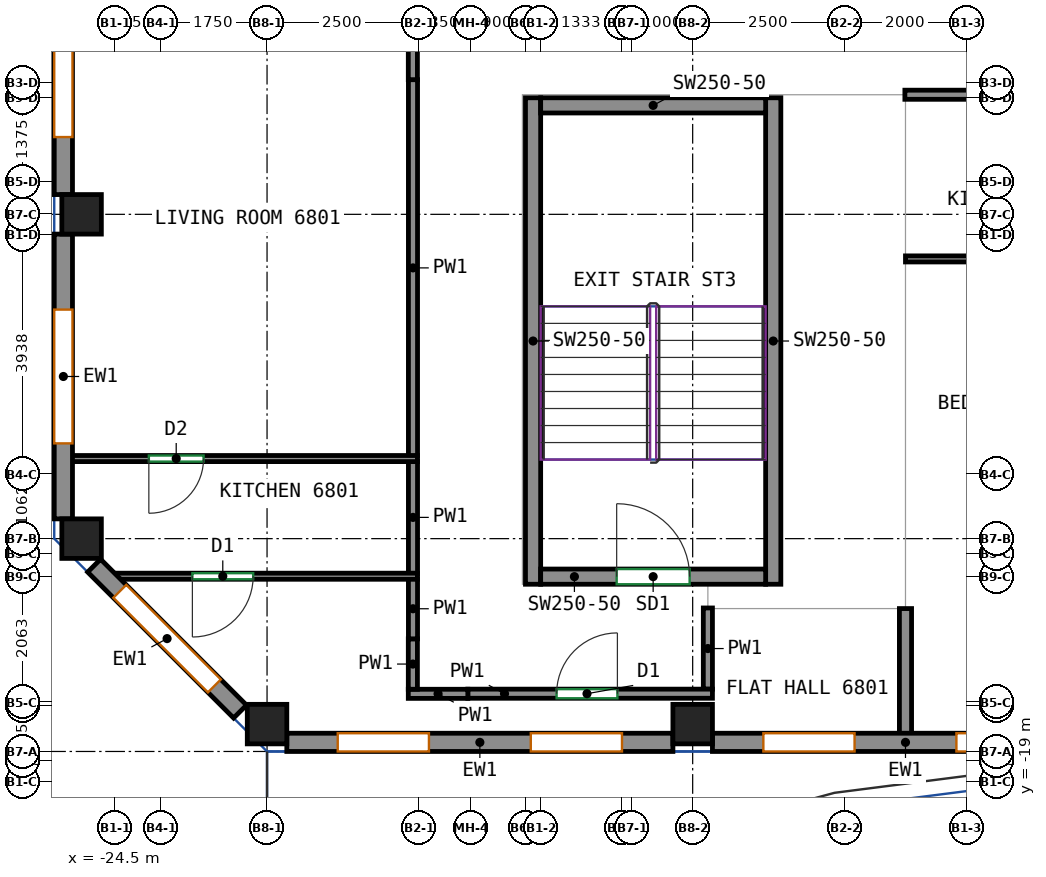
"""IFC4 building model, lengths in metres.
Left out: names, types, materials, properties, quantities, classifications, styles, units other than length and angle.
Written with IfcOpenShell. Run it as: python <this file> out.ifc"""

import sys

from ifc_helpers import new_model, si_unit, direction, frame, frame_2d, origin, origin_2d, place, context, subcontext, project, spatial, rectangle, extrude, source, transform, mapped, element, fill, save


model = new_model("IFC4")
c1 = context("Model", 3, precision=1e-05, world=origin(), true_north=direction((0.0, 1.0)))
c2 = subcontext(c1, "Body", "Model", "MODEL_VIEW")
j1 = project(units=[si_unit("LENGTHUNIT", "METRE"), si_unit("PLANEANGLEUNIT", "RADIAN")], contexts=[c1])
p1 = place(None, origin())
s1 = spatial("IfcSite", under=j1, at=p1, CompositionType="ELEMENT")
p2 = place(p1, origin())
s2 = spatial("IfcBuilding", under=s1, at=p2, CompositionType="ELEMENT")
p3 = place(p2, frame((0.0, 0.0, 277.2)))
s3 = spatial("IfcBuildingStorey", under=s2, at=p3, CompositionType="ELEMENT", Elevation=277.2)
m1 = source(origin(), c2, "Body", "SweptSolid", [
    extrude(rectangle(XDim=0.65, YDim=0.65, at=origin_2d()), origin(), (0.0, 0.0, 1.0), 3.12),
])
for number, where, z_axis, x_axis in (
    (1, (-25.05, -15.0, 0.0), (0.0, 0.0, 1.0), (1.0, 0.0, 0.0)),
    (2, (-25.05, -9.667, 0.0), (0.0, 0.0, 1.0), (1.0, 0.0, 0.0)),
    (3, (-22.0, -18.05, 0.0), (0.0, 0.0, 1.0), (1.0, 0.0, 0.0)),
    (4, (-15.0, -18.05, 0.0), (0.0, 0.0, 1.0), (1.0, 0.0, 0.0)),
):
    element("IfcColumn", number, at=place(p3, frame(where, z_axis=z_axis, x_axis=x_axis)), inside=s3, PredefinedType="COLUMN", context=c2, shape_type="MappedRepresentation", body=[
        mapped(m1, transform((0.0, 0.0, 0.0))),
    ])
m2 = source(origin(), c2, "Body", "SweptSolid", [
    extrude(rectangle(XDim=8.0, YDim=0.25, at=frame_2d((4.0, 0.0))), origin(), (0.0, 0.0, 1.0), 3.12),
])
for number, where, z_axis, x_axis in (
    (5, (-17.625, -15.75, 0.0), (0.0, 0.0, 1.0), (0.0, 1.0, 0.0)),
    (6, (-13.675, -15.75, 0.0), (0.0, 0.0, 1.0), (0.0, 1.0, 0.0)),
):
    element("IfcWall", number, at=place(p3, frame(where, z_axis=z_axis, x_axis=x_axis)), inside=s3, PredefinedType="SHEAR", context=c2, shape_type="MappedRepresentation", body=[
        mapped(m2, transform((0.0, 0.0, 0.0))),
    ])
m3 = source(origin(), c2, "Body", "SweptSolid", [
    extrude(rectangle(XDim=3.7, YDim=0.25, at=frame_2d((1.85, 0.0))), origin(), (0.0, 0.0, 1.0), 3.12),
])
p4 = place(p3, frame((-17.5, -15.625, 0.0), z_axis=(0.0, 0.0, 1.0), x_axis=(1.0, 0.0, 0.0)))
e7 = element("IfcWall", 7, at=p4, inside=s3, PredefinedType="SHEAR", context=c2, shape_type="MappedRepresentation", body=[
    mapped(m3, transform((0.0, 0.0, 0.0))),
])
p5 = place(p4, frame((1.25, 0.0, 0.0)))
e8 = element("IfcOpeningElement", 8, at=p5, cuts=e7, PredefinedType="OPENING", context=c2, shape_type="SweptSolid", body=[
    extrude(rectangle(XDim=1.2, YDim=2.1, at=frame_2d((0.6, 1.05))), frame((0.0, 0.135, 0.0), z_axis=(0.0, -1.0, 0.0), x_axis=(1.0, 0.0, 0.0)), (0.0, 0.0, 1.0), 0.27),
])
p6 = place(p3, frame((-17.5, -7.875, 0.0), z_axis=(0.0, 0.0, 1.0), x_axis=(1.0, 0.0, 0.0)))
e9 = element("IfcWall", 9, at=p6, inside=s3, PredefinedType="SHEAR", context=c2, shape_type="MappedRepresentation", body=[
    mapped(m3, transform((0.0, 0.0, 0.0))),
])
m4 = source(origin(), c2, "Body", "SweptSolid", [
    extrude(rectangle(XDim=6.35, YDim=0.3, at=frame_2d((3.175, 0.0))), origin(), (0.0, 0.0, 1.0), 3.12),
])
p7 = place(p3, frame((-21.675, -18.35, 0.0), z_axis=(0.0, 0.0, 1.0), x_axis=(1.0, 0.0, 0.0)))
e10 = element("IfcWall", 10, at=p7, inside=s3, PredefinedType="SOLIDWALL", context=c2, shape_type="MappedRepresentation", body=[
    mapped(m4, transform((0.0, 0.0, 0.0))),
])
p8 = place(p7, frame((0.837, 0.0, 0.8)))
e11 = element("IfcOpeningElement", 11, at=p8, cuts=e10, PredefinedType="OPENING", context=c2, shape_type="SweptSolid", body=[
    extrude(rectangle(XDim=1.5, YDim=2.05, at=frame_2d((0.75, 1.025))), frame((0.0, 0.16, 0.0), z_axis=(0.0, -1.0, 0.0), x_axis=(1.0, 0.0, 0.0)), (0.0, 0.0, 1.0), 0.32),
])
p9 = place(p7, frame((4.012, 0.0, 0.8)))
e12 = element("IfcOpeningElement", 12, at=p9, cuts=e10, PredefinedType="OPENING", context=c2, shape_type="SweptSolid", body=[
    extrude(rectangle(XDim=1.5, YDim=2.05, at=frame_2d((0.75, 1.025))), frame((0.0, 0.16, 0.0), z_axis=(0.0, -1.0, 0.0), x_axis=(1.0, 0.0, 0.0)), (0.0, 0.0, 1.0), 0.32),
])
p10 = place(p3, frame((-14.675, -18.35, 0.0), z_axis=(0.0, 0.0, 1.0), x_axis=(1.0, 0.0, 0.0)))
e13 = element("IfcWall", 13, at=p10, inside=s3, PredefinedType="SOLIDWALL", context=c2, shape_type="MappedRepresentation", body=[
    mapped(m4, transform((0.0, 0.0, 0.0))),
])
p11 = place(p10, frame((0.837, 0.0, 0.8)))
e14 = element("IfcOpeningElement", 14, at=p11, cuts=e13, PredefinedType="OPENING", context=c2, shape_type="SweptSolid", body=[
    extrude(rectangle(XDim=1.5, YDim=2.05, at=frame_2d((0.75, 1.025))), frame((0.0, 0.16, 0.0), z_axis=(0.0, -1.0, 0.0), x_axis=(1.0, 0.0, 0.0)), (0.0, 0.0, 1.0), 0.32),
])
p12 = place(p10, frame((4.012, 0.0, 0.8)))
e15 = element("IfcOpeningElement", 15, at=p12, cuts=e13, PredefinedType="OPENING", context=c2, shape_type="SweptSolid", body=[
    extrude(rectangle(XDim=1.5, YDim=2.05, at=frame_2d((0.75, 1.025))), frame((0.0, 0.16, 0.0), z_axis=(0.0, -1.0, 0.0), x_axis=(1.0, 0.0, 0.0)), (0.0, 0.0, 1.0), 0.32),
])
m5 = source(origin(), c2, "Body", "SweptSolid", [
    extrude(rectangle(XDim=8.184, YDim=0.3, at=frame_2d((4.092, 0.0))), origin(), (0.0, 0.0, 1.0), 3.12),
])
p13 = place(p3, frame((-25.35, -1.158, 0.0), z_axis=(0.0, 0.0, 1.0), x_axis=(0.0, -1.0, 0.0)))
e16 = element("IfcWall", 16, at=p13, inside=s3, PredefinedType="SOLIDWALL", context=c2, shape_type="MappedRepresentation", body=[
    mapped(m5, transform((0.0, 0.0, 0.0))),
])
p14 = place(p13, frame((0.946, 0.0, 0.8)))
e17 = element("IfcOpeningElement", 17, at=p14, cuts=e16, PredefinedType="OPENING", context=c2, shape_type="SweptSolid", body=[
    extrude(rectangle(XDim=2.2, YDim=2.05, at=frame_2d((1.1, 1.025))), frame((0.0, 0.16, 0.0), z_axis=(0.0, -1.0, 0.0), x_axis=(1.0, 0.0, 0.0)), (0.0, 0.0, 1.0), 0.32),
])
p15 = place(p13, frame((5.038, 0.0, 0.8)))
e18 = element("IfcOpeningElement", 18, at=p15, cuts=e16, PredefinedType="OPENING", context=c2, shape_type="SweptSolid", body=[
    extrude(rectangle(XDim=2.2, YDim=2.05, at=frame_2d((1.1, 1.025))), frame((0.0, 0.16, 0.0), z_axis=(0.0, -1.0, 0.0), x_axis=(1.0, 0.0, 0.0)), (0.0, 0.0, 1.0), 0.32),
])
m6 = source(origin(), c2, "Body", "SweptSolid", [
    extrude(rectangle(XDim=4.683, YDim=0.3, at=frame_2d((2.342, 0.0))), origin(), (0.0, 0.0, 1.0), 3.12),
])
p16 = place(p3, frame((-25.35, -9.992, 0.0), z_axis=(0.0, 0.0, 1.0), x_axis=(0.0, -1.0, 0.0)))
e19 = element("IfcWall", 19, at=p16, inside=s3, PredefinedType="SOLIDWALL", context=c2, shape_type="MappedRepresentation", body=[
    mapped(m6, transform((0.0, 0.0, 0.0))),
])
p17 = place(p16, frame((1.242, 0.0, 0.8)))
e20 = element("IfcOpeningElement", 20, at=p17, cuts=e19, PredefinedType="OPENING", context=c2, shape_type="SweptSolid", body=[
    extrude(rectangle(XDim=2.2, YDim=2.05, at=frame_2d((1.1, 1.025))), frame((0.0, 0.16, 0.0), z_axis=(0.0, -1.0, 0.0), x_axis=(1.0, 0.0, 0.0)), (0.0, 0.0, 1.0), 0.32),
])
m7 = source(origin(), c2, "Body", "SweptSolid", [
    extrude(rectangle(XDim=3.394, YDim=0.3, at=frame_2d((1.697, 0.0))), origin(), (0.0, 0.0, 1.0), 3.12),
])
p18 = place(p3, frame((-24.844, -15.444, 0.0), z_axis=(0.0, 0.0, 1.0), x_axis=(0.707070815327, -0.707142745217, 0.0)))
e21 = element("IfcWall", 21, at=p18, inside=s3, PredefinedType="SOLIDWALL", context=c2, shape_type="MappedRepresentation", body=[
    mapped(m7, transform((0.0, 0.0, 0.0))),
])
p19 = place(p18, frame((0.597, 0.0, 0.8)))
e22 = element("IfcOpeningElement", 22, at=p19, cuts=e21, PredefinedType="OPENING", context=c2, shape_type="SweptSolid", body=[
    extrude(rectangle(XDim=2.2, YDim=2.05, at=frame_2d((1.1, 1.025))), frame((0.0, 0.16, 0.0), z_axis=(0.0, -1.0, 0.0), x_axis=(1.0, 0.0, 0.0)), (0.0, 0.0, 1.0), 0.32),
])
p20 = place(p3, frame((-14.75, -17.475, 0.0), z_axis=(0.0, 0.0, 1.0), x_axis=(0.0, 1.0, 0.0)))
e23 = element("IfcWall", 23, at=p20, inside=s3, PredefinedType="PARTITIONING", context=c2, shape_type="SweptSolid", body=[
    extrude(rectangle(XDim=1.335, YDim=0.15, at=frame_2d((0.667, 0.0))), origin(), (0.0, 0.0, 1.0), 3.12),
])
p21 = place(p3, frame((-18.698, -17.55, 0.0), z_axis=(0.0, 0.0, 1.0), x_axis=(1.0, 0.0, 0.0)))
e24 = element("IfcWall", 24, at=p21, inside=s3, PredefinedType="PARTITIONING", context=c2, shape_type="SweptSolid", body=[
    extrude(rectangle(XDim=4.023, YDim=0.15, at=frame_2d((2.011, 0.0))), origin(), (0.0, 0.0, 1.0), 3.12),
])
p22 = place(p21, frame((1.46, 0.0, 0.0)))
e25 = element("IfcOpeningElement", 25, at=p22, cuts=e24, PredefinedType="OPENING", context=c2, shape_type="SweptSolid", body=[
    extrude(rectangle(XDim=1.0, YDim=2.1, at=frame_2d((0.5, 1.05))), frame((0.0, 0.085, 0.0), z_axis=(0.0, -1.0, 0.0), x_axis=(1.0, 0.0, 0.0)), (0.0, 0.0, 1.0), 0.17),
])
p23 = place(p3, frame((-19.677, -17.552, 0.0), z_axis=(0.0, 0.0, 1.0), x_axis=(1.0, 0.0, 0.0)))
e26 = element("IfcWall", 26, at=p23, inside=s3, PredefinedType="PARTITIONING", context=c2, shape_type="SweptSolid", body=[
    extrude(rectangle(XDim=0.979, YDim=0.15, at=frame_2d((0.49, 0.0))), origin(), (0.0, 0.0, 1.0), 3.12),
])
p24 = place(p3, frame((-19.602, -17.477, 0.0), z_axis=(0.0, 0.0, 1.0), x_axis=(0.0, 1.0, 0.0)))
e27 = element("IfcWall", 27, at=p24, inside=s3, PredefinedType="PARTITIONING", context=c2, shape_type="SweptSolid", body=[
    extrude(rectangle(XDim=0.829, YDim=0.15, at=frame_2d((0.415, 0.0))), origin(), (0.0, 0.0, 1.0), 3.12),
])
p25 = place(p3, frame((-19.6, -16.648, 0.0), z_axis=(0.0, 0.0, 1.0), x_axis=(0.0, 1.0, 0.0)))
e28 = element("IfcWall", 28, at=p25, inside=s3, PredefinedType="PARTITIONING", context=c2, shape_type="SweptSolid", body=[
    extrude(rectangle(XDim=0.99, YDim=0.15, at=frame_2d((0.495, 0.0))), origin(), (0.0, 0.0, 1.0), 3.12),
])
p26 = place(p3, frame((-19.6, -15.578, 0.0), z_axis=(0.0, 0.0, 1.0), x_axis=(0.0, 1.0, 0.0)))
e29 = element("IfcWall", 29, at=p26, inside=s3, PredefinedType="PARTITIONING", context=c2, shape_type="SweptSolid", body=[
    extrude(rectangle(XDim=1.855, YDim=0.15, at=frame_2d((0.927, 0.0))), origin(), (0.0, 0.0, 1.0), 3.12),
])
p27 = place(p3, frame((-19.6, -13.643, 0.0), z_axis=(0.0, 0.0, 1.0), x_axis=(0.0, 1.0, 0.0)))
e30 = element("IfcWall", 30, at=p27, inside=s3, PredefinedType="PARTITIONING", context=c2, shape_type="SweptSolid", body=[
    extrude(rectangle(XDim=6.191, YDim=0.15, at=frame_2d((3.096, 0.0))), origin(), (0.0, 0.0, 1.0), 3.12),
])
p28 = place(p3, frame((-19.602, -7.452, 0.0), z_axis=(0.0, 0.0, 1.0), x_axis=(0.0, 1.0, 0.0)))
e31 = element("IfcWall", 31, at=p28, inside=s3, PredefinedType="PARTITIONING", context=c2, shape_type="SweptSolid", body=[
    extrude(rectangle(XDim=1.381, YDim=0.15, at=frame_2d((0.69, 0.0))), origin(), (0.0, 0.0, 1.0), 3.12),
])
p29 = place(p3, frame((-11.51, -7.7, 0.0), z_axis=(0.0, 0.0, 1.0), x_axis=(1.0, 0.0, 0.0)))
e32 = element("IfcWall", 32, at=p29, inside=s3, PredefinedType="PARTITIONING", context=c2, shape_type="SweptSolid", body=[
    extrude(rectangle(XDim=21.02, YDim=0.15, at=frame_2d((10.51, 0.0))), origin(), (0.0, 0.0, 1.0), 3.12),
])
p30 = place(p29, frame((3.24, 0.0, 0.0)))
e33 = element("IfcOpeningElement", 33, at=p30, cuts=e32, PredefinedType="OPENING", context=c2, shape_type="SweptSolid", body=[
    extrude(rectangle(XDim=1.0, YDim=2.1, at=frame_2d((0.5, 1.05))), frame((0.0, 0.085, 0.0), z_axis=(0.0, -1.0, 0.0), x_axis=(1.0, 0.0, 0.0)), (0.0, 0.0, 1.0), 0.17),
])
p31 = place(p29, frame((14.321, 0.0, 0.0)))
e34 = element("IfcOpeningElement", 34, at=p31, cuts=e32, PredefinedType="OPENING", context=c2, shape_type="SweptSolid", body=[
    extrude(rectangle(XDim=1.0, YDim=2.1, at=frame_2d((0.5, 1.05))), frame((0.0, 0.085, 0.0), z_axis=(0.0, -1.0, 0.0), x_axis=(1.0, 0.0, 0.0)), (0.0, 0.0, 1.0), 0.17),
])
p32 = place(p3, frame((-19.527, -15.618, 0.0), z_axis=(0.0, 0.0, 1.0), x_axis=(-1.0, 0.0, 0.0)))
e35 = element("IfcWall", 35, at=p32, inside=s3, PredefinedType="PARTITIONING", context=c2, shape_type="SweptSolid", body=[
    extrude(rectangle(XDim=5.001, YDim=0.1, at=frame_2d((2.5, 0.0))), origin(), (0.0, 0.0, 1.0), 3.12),
])
p33 = place(p32, frame((2.701, 0.0, 0.0)))
e36 = element("IfcOpeningElement", 36, at=p33, cuts=e35, PredefinedType="OPENING", context=c2, shape_type="SweptSolid", body=[
    extrude(rectangle(XDim=1.0, YDim=2.1, at=frame_2d((0.5, 1.05))), frame((0.0, 0.06, 0.0), z_axis=(0.0, -1.0, 0.0), x_axis=(1.0, 0.0, 0.0)), (0.0, 0.0, 1.0), 0.12),
])
p34 = place(p3, frame((-11.5, -18.25, 0.0), z_axis=(0.0, 0.0, 1.0), x_axis=(0.0, 1.0, 0.0)))
e37 = element("IfcWall", 37, at=p34, inside=s3, PredefinedType="PARTITIONING", context=c2, shape_type="SweptSolid", body=[
    extrude(rectangle(XDim=2.1, YDim=0.2, at=frame_2d((1.05, 0.0))), origin(), (0.0, 0.0, 1.0), 3.12),
])
p35 = place(p3, frame((-19.527, -13.683, 0.0), z_axis=(0.0, 0.0, 1.0), x_axis=(-1.0, 0.0, 0.0)))
e38 = element("IfcWall", 38, at=p35, inside=s3, PredefinedType="PARTITIONING", context=c2, shape_type="SweptSolid", body=[
    extrude(rectangle(XDim=5.723, YDim=0.1, at=frame_2d((2.861, 0.0))), origin(), (0.0, 0.0, 1.0), 3.12),
])
p36 = place(p35, frame((3.517, 0.0, 0.0)))
e39 = element("IfcOpeningElement", 39, at=p36, cuts=e38, PredefinedType="OPENING", context=c2, shape_type="SweptSolid", body=[
    extrude(rectangle(XDim=0.9, YDim=2.1, at=frame_2d((0.45, 1.05))), frame((0.0, 0.06, 0.0), z_axis=(0.0, -1.0, 0.0), x_axis=(1.0, 0.0, 0.0)), (0.0, 0.0, 1.0), 0.12),
])
p37 = place(p3, frame((-11.5, -10.4, 0.0), z_axis=(0.0, 0.0, 1.0), x_axis=(1.0, 0.0, 0.0)))
e40 = element("IfcWall", 40, at=p37, inside=s3, PredefinedType="PARTITIONING", context=c2, shape_type="SweptSolid", body=[
    extrude(rectangle(XDim=21.1, YDim=0.1, at=frame_2d((10.55, 0.0))), origin(), (0.0, 0.0, 1.0), 3.12),
])
p38 = place(p37, frame((4.05, 0.0, 0.0)))
e41 = element("IfcOpeningElement", 41, at=p38, cuts=e40, PredefinedType="OPENING", context=c2, shape_type="SweptSolid", body=[
    extrude(rectangle(XDim=1.0, YDim=2.1, at=frame_2d((0.5, 1.05))), frame((0.0, 0.06, 0.0), z_axis=(0.0, -1.0, 0.0), x_axis=(1.0, 0.0, 0.0)), (0.0, 0.0, 1.0), 0.12),
])
p39 = place(p37, frame((11.727, 0.0, 0.0)))
e42 = element("IfcOpeningElement", 42, at=p39, cuts=e40, PredefinedType="OPENING", context=c2, shape_type="SweptSolid", body=[
    extrude(rectangle(XDim=0.9, YDim=2.1, at=frame_2d((0.45, 1.05))), frame((0.0, 0.06, 0.0), z_axis=(0.0, -1.0, 0.0), x_axis=(1.0, 0.0, 0.0)), (0.0, 0.0, 1.0), 0.12),
])
p40 = place(p37, frame((15.225, 0.0, 0.0)))
e43 = element("IfcOpeningElement", 43, at=p40, cuts=e40, PredefinedType="OPENING", context=c2, shape_type="SweptSolid", body=[
    extrude(rectangle(XDim=1.0, YDim=2.1, at=frame_2d((0.5, 1.05))), frame((0.0, 0.06, 0.0), z_axis=(0.0, -1.0, 0.0), x_axis=(1.0, 0.0, 0.0)), (0.0, 0.0, 1.0), 0.12),
])
p41 = place(p8, origin())
e44 = element("IfcWindow", 44, at=p41, inside=s3, PartitioningType="SINGLE_PANEL", PredefinedType="WINDOW", context=c2, shape_type="SweptSolid", body=[
    extrude(rectangle(XDim=1.5, YDim=2.05, at=frame_2d((0.75, 1.025))), frame((0.0, 0.03, 0.0), z_axis=(0.0, -1.0, 0.0), x_axis=(1.0, 0.0, 0.0)), (0.0, 0.0, 1.0), 0.06),
])
fill(e11, e44)
p42 = place(p9, origin())
e45 = element("IfcWindow", 45, at=p42, inside=s3, PartitioningType="SINGLE_PANEL", PredefinedType="WINDOW", context=c2, shape_type="SweptSolid", body=[
    extrude(rectangle(XDim=1.5, YDim=2.05, at=frame_2d((0.75, 1.025))), frame((0.0, 0.03, 0.0), z_axis=(0.0, -1.0, 0.0), x_axis=(1.0, 0.0, 0.0)), (0.0, 0.0, 1.0), 0.06),
])
fill(e12, e45)
p43 = place(p11, origin())
e46 = element("IfcWindow", 46, at=p43, inside=s3, PartitioningType="SINGLE_PANEL", PredefinedType="WINDOW", context=c2, shape_type="SweptSolid", body=[
    extrude(rectangle(XDim=1.5, YDim=2.05, at=frame_2d((0.75, 1.025))), frame((0.0, 0.03, 0.0), z_axis=(0.0, -1.0, 0.0), x_axis=(1.0, 0.0, 0.0)), (0.0, 0.0, 1.0), 0.06),
])
fill(e14, e46)
p44 = place(p12, origin())
e47 = element("IfcWindow", 47, at=p44, inside=s3, PartitioningType="SINGLE_PANEL", PredefinedType="WINDOW", context=c2, shape_type="SweptSolid", body=[
    extrude(rectangle(XDim=1.5, YDim=2.05, at=frame_2d((0.75, 1.025))), frame((0.0, 0.03, 0.0), z_axis=(0.0, -1.0, 0.0), x_axis=(1.0, 0.0, 0.0)), (0.0, 0.0, 1.0), 0.06),
])
fill(e15, e47)
p45 = place(p15, origin())
e48 = element("IfcWindow", 48, at=p45, inside=s3, PartitioningType="SINGLE_PANEL", PredefinedType="WINDOW", context=c2, shape_type="SweptSolid", body=[
    extrude(rectangle(XDim=2.2, YDim=2.05, at=frame_2d((1.1, 1.025))), frame((0.0, 0.03, 0.0), z_axis=(0.0, -1.0, 0.0), x_axis=(1.0, 0.0, 0.0)), (0.0, 0.0, 1.0), 0.06),
])
fill(e18, e48)
p46 = place(p17, origin())
e49 = element("IfcWindow", 49, at=p46, inside=s3, PartitioningType="SINGLE_PANEL", PredefinedType="WINDOW", context=c2, shape_type="SweptSolid", body=[
    extrude(rectangle(XDim=2.2, YDim=2.05, at=frame_2d((1.1, 1.025))), frame((0.0, 0.03, 0.0), z_axis=(0.0, -1.0, 0.0), x_axis=(1.0, 0.0, 0.0)), (0.0, 0.0, 1.0), 0.06),
])
fill(e20, e49)
p47 = place(p19, origin())
e50 = element("IfcWindow", 50, at=p47, inside=s3, PartitioningType="SINGLE_PANEL", PredefinedType="WINDOW", context=c2, shape_type="SweptSolid", body=[
    extrude(rectangle(XDim=2.2, YDim=2.05, at=frame_2d((1.1, 1.025))), frame((0.0, 0.03, 0.0), z_axis=(0.0, -1.0, 0.0), x_axis=(1.0, 0.0, 0.0)), (0.0, 0.0, 1.0), 0.06),
])
fill(e22, e50)
p48 = place(p5, origin())
e51 = element("IfcDoor", 51, at=p48, inside=s3, OperationType="DOUBLE_DOOR_SINGLE_SWING", PredefinedType="DOOR", context=c2, shape_type="SweptSolid", body=[
    extrude(rectangle(XDim=1.2, YDim=2.1, at=frame_2d((0.6, 1.05))), frame((0.0, 0.025, 0.0), z_axis=(0.0, -1.0, 0.0), x_axis=(1.0, 0.0, 0.0)), (0.0, 0.0, 1.0), 0.05),
])
fill(e8, e51)
p49 = place(p22, origin())
e52 = element("IfcDoor", 52, at=p49, inside=s3, OperationType="SINGLE_SWING_RIGHT", PredefinedType="DOOR", context=c2, shape_type="SweptSolid", body=[
    extrude(rectangle(XDim=1.0, YDim=2.1, at=frame_2d((0.5, 1.05))), frame((0.0, 0.025, 0.0), z_axis=(0.0, -1.0, 0.0), x_axis=(1.0, 0.0, 0.0)), (0.0, 0.0, 1.0), 0.05),
])
fill(e25, e52)
p50 = place(p33, origin())
e53 = element("IfcDoor", 53, at=p50, inside=s3, OperationType="SINGLE_SWING_RIGHT", PredefinedType="DOOR", context=c2, shape_type="SweptSolid", body=[
    extrude(rectangle(XDim=1.0, YDim=2.1, at=frame_2d((0.5, 1.05))), frame((0.0, 0.025, 0.0), z_axis=(0.0, -1.0, 0.0), x_axis=(1.0, 0.0, 0.0)), (0.0, 0.0, 1.0), 0.05),
])
fill(e36, e53)
p51 = place(p36, origin())
e54 = element("IfcDoor", 54, at=p51, inside=s3, OperationType="SINGLE_SWING_RIGHT", PredefinedType="DOOR", context=c2, shape_type="SweptSolid", body=[
    extrude(rectangle(XDim=0.9, YDim=2.1, at=frame_2d((0.45, 1.05))), frame((0.0, 0.025, 0.0), z_axis=(0.0, -1.0, 0.0), x_axis=(1.0, 0.0, 0.0)), (0.0, 0.0, 1.0), 0.05),
])
fill(e39, e54)
save(model, sys.argv[1])
